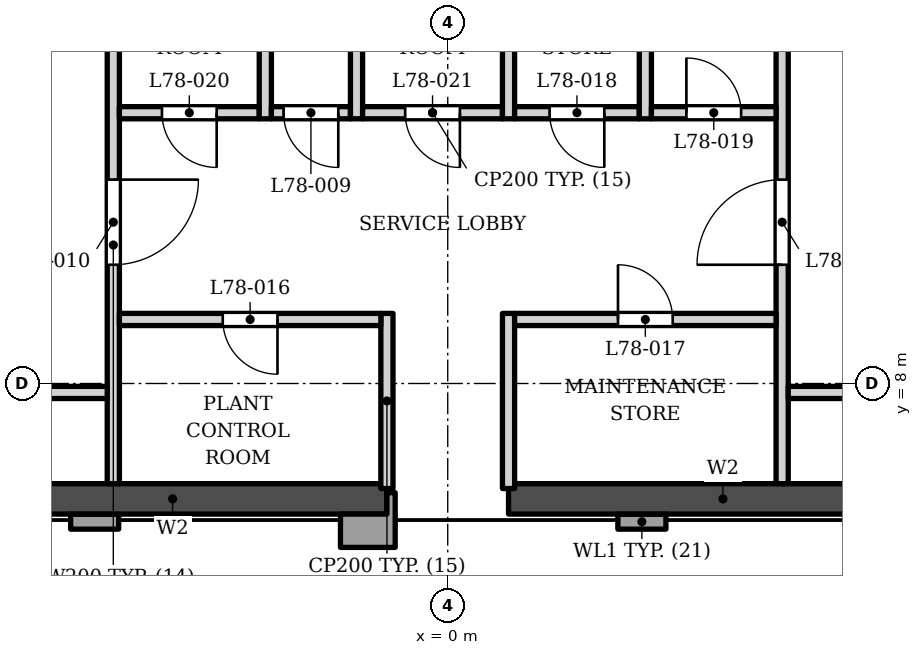
"""IFC4 building model, lengths in metres.
Left out: names, types, materials, properties, quantities, classifications, styles, units other than length and angle.
Written with IfcOpenShell. Run it as: python <this file> out.ifc"""

import sys

from ifc_helpers import new_model, si_unit, direction, frame, frame_2d, origin, place, context, subcontext, project, spatial, polyline, rectangle, outline, extrude, element, fill, save


model = new_model("IFC4")
c1 = context("Model", 3, precision=1e-05, world=origin(), true_north=direction((0.0, 1.0)))
c2 = subcontext(c1, "Body", "Model", "MODEL_VIEW")
j1 = project(units=[si_unit("LENGTHUNIT", "METRE"), si_unit("PLANEANGLEUNIT", "RADIAN")], contexts=[c1])
p1 = place(None, origin())
s1 = spatial("IfcSite", under=j1, at=p1, CompositionType="ELEMENT")
p2 = place(p1, origin())
s2 = spatial("IfcBuilding", under=s1, at=p2, CompositionType="ELEMENT")
p3 = place(p2, frame((0.0, 0.0, 335.5)))
s3 = spatial("IfcBuildingStorey", under=s2, at=p3, CompositionType="ELEMENT", Elevation=335.5)
for number, where, z_axis, x_axis in (
    (1, (-8.05, 6.103, 0.0), (0.0, 0.0, 1.0), (1.0, 0.0, 0.0)),
    (2, (1.0, 6.103, 0.0), (0.0, 0.0, 1.0), (1.0, 0.0, 0.0)),
):
    element("IfcWall", number, at=place(p3, frame(where, z_axis=z_axis, x_axis=x_axis)), inside=s3, PredefinedType="SHEAR", context=c2, shape_type="SweptSolid", body=[
        extrude(rectangle(XDim=7.05, YDim=0.5, at=frame_2d((3.525, 0.0))), origin(), (0.0, 0.0, 1.0), 3.758),
    ])
p4 = place(p3, origin())
e3 = element("IfcWall", 3, at=p4, inside=s3, PredefinedType="SOLIDWALL", context=c2, shape_type="SweptSolid", body=[
    extrude(outline(polyline([(-0.864, 5.304), (-0.864, 6.204), (-1.0, 6.204), (-1.0, 5.853), (-1.764, 5.853), (-1.764, 5.304), (-0.864, 5.304)])), origin(), (0.0, 0.0, 1.0), 3.297),
])
for number, where, z_axis, x_axis in (
    (4, (-6.202, 5.727, 0.0), (0.0, 0.0, 1.0), (1.0, 0.0, 0.0)),
    (5, (2.798, 5.727, 0.0), (0.0, 0.0, 1.0), (1.0, 0.0, 0.0)),
):
    element("IfcWall", number, at=place(p3, frame(where, z_axis=z_axis, x_axis=x_axis)), inside=s3, PredefinedType="ELEMENTEDWALL", context=c2, shape_type="SweptSolid", body=[
        extrude(rectangle(XDim=0.79, YDim=0.244, at=frame_2d((0.395, 0.0))), origin(), (0.0, 0.0, 1.0), 3.279),
    ])
for number, where, z_axis, x_axis in (
    (6, (-1.0, 6.273, 0.0), (0.0, 0.0, 1.0), (0.0, 1.0, 0.0)),
    (7, (1.0, 6.273, 0.0), (0.0, 0.0, 1.0), (0.0, 1.0, 0.0)),
):
    element("IfcWall", number, at=place(p3, frame(where, z_axis=z_axis, x_axis=x_axis)), inside=s3, PredefinedType="PARTITIONING", context=c2, shape_type="SweptSolid", body=[
        extrude(outline(polyline([(0.0, 0.0), (2.88, 0.0), (2.88, 4.7), (0.703, 4.7), (0.0, 4.11), (0.0, 0.0)])), frame((0.0, 0.1, 0.0), z_axis=(0.0, -1.0, 0.0), x_axis=(1.0, 0.0, 0.0)), (0.0, 0.0, 1.0), 0.2),
    ])
p5 = place(p3, frame((-5.5, 6.353, 0.0), z_axis=(0.0, 0.0, 1.0), x_axis=(0.0, 1.0, 0.0)))
e8 = element("IfcWall", 8, at=p5, inside=s3, PredefinedType="SOLIDWALL", context=c2, shape_type="SweptSolid", body=[
    extrude(outline(polyline([(0.0, 0.0), (7.85, 0.0), (7.85, 4.7), (0.623, 4.7), (0.0, 4.177), (0.0, 0.0)])), frame((0.0, 0.1, 0.0), z_axis=(0.0, -1.0, 0.0), x_axis=(1.0, 0.0, 0.0)), (0.0, 0.0, 1.0), 0.2),
])
p6 = place(p5, frame((3.6, 0.0, 0.0)))
e9 = element("IfcOpeningElement", 9, at=p6, cuts=e8, PredefinedType="OPENING", context=c2, shape_type="SweptSolid", body=[
    extrude(rectangle(XDim=1.4, YDim=2.1, at=frame_2d((0.7, 1.05))), frame((0.0, 0.11, 0.0), z_axis=(0.0, -1.0, 0.0), x_axis=(1.0, 0.0, 0.0)), (0.0, 0.0, 1.0), 0.22),
])
p7 = place(p3, frame((5.5, 6.353, 0.0), z_axis=(0.0, 0.0, 1.0), x_axis=(0.0, 1.0, 0.0)))
e10 = element("IfcWall", 10, at=p7, inside=s3, PredefinedType="SOLIDWALL", context=c2, shape_type="SweptSolid", body=[
    extrude(outline(polyline([(0.0, 0.0), (7.85, 0.0), (7.85, 4.7), (0.623, 4.7), (0.0, 4.177), (0.0, 0.0)])), frame((0.0, 0.1, 0.0), z_axis=(0.0, -1.0, 0.0), x_axis=(1.0, 0.0, 0.0)), (0.0, 0.0, 1.0), 0.2),
])
p8 = place(p7, frame((3.6, 0.0, 0.0)))
e11 = element("IfcOpeningElement", 11, at=p8, cuts=e10, PredefinedType="OPENING", context=c2, shape_type="SweptSolid", body=[
    extrude(rectangle(XDim=1.4, YDim=2.1, at=frame_2d((0.7, 1.05))), frame((0.0, 0.11, 0.0), z_axis=(0.0, -1.0, 0.0), x_axis=(1.0, 0.0, 0.0)), (0.0, 0.0, 1.0), 0.22),
])
for number, where, z_axis, x_axis in (
    (12, (-8.05, 7.853, 0.0), (0.0, 0.0, 1.0), (1.0, 0.0, 0.0)),
    (13, (5.6, 7.853, 0.0), (0.0, 0.0, 1.0), (1.0, 0.0, 0.0)),
):
    element("IfcWall", number, at=place(p3, frame(where, z_axis=z_axis, x_axis=x_axis)), inside=s3, PredefinedType="SOLIDWALL", context=c2, shape_type="SweptSolid", body=[
        extrude(rectangle(XDim=2.45, YDim=0.2, at=frame_2d((1.225, 0.0))), origin(), (0.0, 0.0, 1.0), 4.7),
    ])
p9 = place(p3, frame((-5.4, 9.052, 0.0), z_axis=(0.0, 0.0, 1.0), x_axis=(1.0, 0.0, 0.0)))
e14 = element("IfcWall", 14, at=p9, inside=s3, PredefinedType="PARTITIONING", context=c2, shape_type="SweptSolid", body=[
    extrude(rectangle(XDim=4.3, YDim=0.2, at=frame_2d((2.15, 0.0))), origin(), (0.0, 0.0, 1.0), 4.7),
])
p10 = place(p9, frame((1.7, 0.0, 0.0)))
e15 = element("IfcOpeningElement", 15, at=p10, cuts=e14, PredefinedType="OPENING", context=c2, shape_type="SweptSolid", body=[
    extrude(rectangle(XDim=0.9, YDim=2.1, at=frame_2d((0.45, 1.05))), frame((0.0, 0.11, 0.0), z_axis=(0.0, -1.0, 0.0), x_axis=(1.0, 0.0, 0.0)), (0.0, 0.0, 1.0), 0.22),
])
p11 = place(p3, frame((1.1, 9.052, 0.0), z_axis=(0.0, 0.0, 1.0), x_axis=(1.0, 0.0, 0.0)))
e16 = element("IfcWall", 16, at=p11, inside=s3, PredefinedType="PARTITIONING", context=c2, shape_type="SweptSolid", body=[
    extrude(rectangle(XDim=4.3, YDim=0.2, at=frame_2d((2.15, 0.0))), origin(), (0.0, 0.0, 1.0), 4.7),
])
p12 = place(p11, frame((1.7, 0.0, 0.0)))
e17 = element("IfcOpeningElement", 17, at=p12, cuts=e16, PredefinedType="OPENING", context=c2, shape_type="SweptSolid", body=[
    extrude(rectangle(XDim=0.9, YDim=2.1, at=frame_2d((0.45, 1.05))), frame((0.0, 0.11, 0.0), z_axis=(0.0, -1.0, 0.0), x_axis=(1.0, 0.0, 0.0)), (0.0, 0.0, 1.0), 0.22),
])
p13 = place(p3, frame((-5.4, 12.453, 0.0), z_axis=(0.0, 0.0, 1.0), x_axis=(1.0, 0.0, 0.0)))
e18 = element("IfcWall", 18, at=p13, inside=s3, PredefinedType="PARTITIONING", context=c2, shape_type="SweptSolid", body=[
    extrude(rectangle(XDim=2.3, YDim=0.2, at=frame_2d((1.15, 0.0))), origin(), (0.0, 0.0, 1.0), 4.7),
])
p14 = place(p13, frame((0.7, 0.0, 0.0)))
e19 = element("IfcOpeningElement", 19, at=p14, cuts=e18, PredefinedType="OPENING", context=c2, shape_type="SweptSolid", body=[
    extrude(rectangle(XDim=0.9, YDim=2.1, at=frame_2d((0.45, 1.05))), frame((0.0, 0.11, 0.0), z_axis=(0.0, -1.0, 0.0), x_axis=(1.0, 0.0, 0.0)), (0.0, 0.0, 1.0), 0.22),
])
p15 = place(p3, frame((-3.0, 12.353, 0.0), z_axis=(0.0, 0.0, 1.0), x_axis=(0.0, 1.0, 0.0)))
e20 = element("IfcWall", 20, at=p15, inside=s3, PredefinedType="PARTITIONING", context=c2, shape_type="SweptSolid", body=[
    extrude(rectangle(XDim=6.2, YDim=0.2, at=frame_2d((3.1, 0.0))), origin(), (0.0, 0.0, 1.0), 4.7),
])
p16 = place(p15, frame((3.425, 0.0, 0.0)))
e21 = element("IfcOpeningElement", 21, at=p16, cuts=e20, PredefinedType="OPENING", context=c2, shape_type="SweptSolid", body=[
    extrude(rectangle(XDim=0.9, YDim=2.1, at=frame_2d((0.45, 1.05))), frame((0.0, 0.11, 0.0), z_axis=(0.0, -1.0, 0.0), x_axis=(1.0, 0.0, 0.0)), (0.0, 0.0, 1.0), 0.22),
])
p17 = place(p15, frame((4.975, 0.0, 0.0)))
e22 = element("IfcOpeningElement", 22, at=p17, cuts=e20, PredefinedType="OPENING", context=c2, shape_type="SweptSolid", body=[
    extrude(rectangle(XDim=0.9, YDim=2.1, at=frame_2d((0.45, 1.05))), frame((0.0, 0.11, 0.0), z_axis=(0.0, -1.0, 0.0), x_axis=(1.0, 0.0, 0.0)), (0.0, 0.0, 1.0), 0.22),
])
p18 = place(p3, frame((-2.9, 12.453, 0.0), z_axis=(0.0, 0.0, 1.0), x_axis=(1.0, 0.0, 0.0)))
e23 = element("IfcWall", 23, at=p18, inside=s3, PredefinedType="PARTITIONING", context=c2, shape_type="SweptSolid", body=[
    extrude(rectangle(XDim=1.3, YDim=0.2, at=frame_2d((0.65, 0.0))), origin(), (0.0, 0.0, 1.0), 4.7),
])
p19 = place(p18, frame((0.2, 0.0, 0.0)))
e24 = element("IfcOpeningElement", 24, at=p19, cuts=e23, PredefinedType="OPENING", context=c2, shape_type="SweptSolid", body=[
    extrude(rectangle(XDim=0.9, YDim=2.1, at=frame_2d((0.45, 1.05))), frame((0.0, 0.11, 0.0), z_axis=(0.0, -1.0, 0.0), x_axis=(1.0, 0.0, 0.0)), (0.0, 0.0, 1.0), 0.22),
])
p20 = place(p3, frame((-1.5, 12.353, 0.0), z_axis=(0.0, 0.0, 1.0), x_axis=(0.0, 1.0, 0.0)))
e25 = element("IfcWall", 25, at=p20, inside=s3, PredefinedType="PARTITIONING", context=c2, shape_type="SweptSolid", body=[
    extrude(rectangle(XDim=6.2, YDim=0.2, at=frame_2d((3.1, 0.0))), origin(), (0.0, 0.0, 1.0), 4.7),
])
p21 = place(p20, frame((3.27, 0.0, 0.0)))
e26 = element("IfcOpeningElement", 26, at=p21, cuts=e25, PredefinedType="OPENING", context=c2, shape_type="SweptSolid", body=[
    extrude(rectangle(XDim=0.9, YDim=2.1, at=frame_2d((0.45, 1.05))), frame((0.0, 0.11, 0.0), z_axis=(0.0, -1.0, 0.0), x_axis=(1.0, 0.0, 0.0)), (0.0, 0.0, 1.0), 0.22),
])
p22 = place(p20, frame((4.82, 0.0, 0.0)))
e27 = element("IfcOpeningElement", 27, at=p22, cuts=e25, PredefinedType="OPENING", context=c2, shape_type="SweptSolid", body=[
    extrude(rectangle(XDim=0.9, YDim=2.1, at=frame_2d((0.45, 1.05))), frame((0.0, 0.11, 0.0), z_axis=(0.0, -1.0, 0.0), x_axis=(1.0, 0.0, 0.0)), (0.0, 0.0, 1.0), 0.22),
])
p23 = place(p3, frame((-1.4, 12.453, 0.0), z_axis=(0.0, 0.0, 1.0), x_axis=(1.0, 0.0, 0.0)))
e28 = element("IfcWall", 28, at=p23, inside=s3, PredefinedType="PARTITIONING", context=c2, shape_type="SweptSolid", body=[
    extrude(rectangle(XDim=2.3, YDim=0.2, at=frame_2d((1.15, 0.0))), origin(), (0.0, 0.0, 1.0), 4.7),
])
p24 = place(p23, frame((0.7, 0.0, 0.0)))
e29 = element("IfcOpeningElement", 29, at=p24, cuts=e28, PredefinedType="OPENING", context=c2, shape_type="SweptSolid", body=[
    extrude(rectangle(XDim=0.9, YDim=2.1, at=frame_2d((0.45, 1.05))), frame((0.0, 0.11, 0.0), z_axis=(0.0, -1.0, 0.0), x_axis=(1.0, 0.0, 0.0)), (0.0, 0.0, 1.0), 0.22),
])
p25 = place(p3, frame((1.0, 12.353, 0.0), z_axis=(0.0, 0.0, 1.0), x_axis=(0.0, 1.0, 0.0)))
e30 = element("IfcWall", 30, at=p25, inside=s3, PredefinedType="PARTITIONING", context=c2, shape_type="SweptSolid", body=[
    extrude(rectangle(XDim=3.2, YDim=0.2, at=frame_2d((1.6, 0.0))), origin(), (0.0, 0.0, 1.0), 4.7),
])
p26 = place(p3, frame((1.1, 12.453, 0.0), z_axis=(0.0, 0.0, 1.0), x_axis=(1.0, 0.0, 0.0)))
e31 = element("IfcWall", 31, at=p26, inside=s3, PredefinedType="PARTITIONING", context=c2, shape_type="SweptSolid", body=[
    extrude(rectangle(XDim=2.05, YDim=0.2, at=frame_2d((1.025, 0.0))), origin(), (0.0, 0.0, 1.0), 4.7),
])
p27 = place(p26, frame((0.575, 0.0, 0.0)))
e32 = element("IfcOpeningElement", 32, at=p27, cuts=e31, PredefinedType="OPENING", context=c2, shape_type="SweptSolid", body=[
    extrude(rectangle(XDim=0.9, YDim=2.1, at=frame_2d((0.45, 1.05))), frame((0.0, 0.11, 0.0), z_axis=(0.0, -1.0, 0.0), x_axis=(1.0, 0.0, 0.0)), (0.0, 0.0, 1.0), 0.22),
])
p28 = place(p3, frame((3.25, 12.353, 0.0), z_axis=(0.0, 0.0, 1.0), x_axis=(0.0, 1.0, 0.0)))
e33 = element("IfcWall", 33, at=p28, inside=s3, PredefinedType="PARTITIONING", context=c2, shape_type="SweptSolid", body=[
    extrude(rectangle(XDim=3.2, YDim=0.2, at=frame_2d((1.6, 0.0))), origin(), (0.0, 0.0, 1.0), 4.7),
])
p29 = place(p3, frame((3.35, 12.453, 0.0), z_axis=(0.0, 0.0, 1.0), x_axis=(1.0, 0.0, 0.0)))
e34 = element("IfcWall", 34, at=p29, inside=s3, PredefinedType="PARTITIONING", context=c2, shape_type="SweptSolid", body=[
    extrude(rectangle(XDim=2.05, YDim=0.2, at=frame_2d((1.025, 0.0))), origin(), (0.0, 0.0, 1.0), 4.7),
])
p30 = place(p29, frame((0.575, 0.0, 0.0)))
e35 = element("IfcOpeningElement", 35, at=p30, cuts=e34, PredefinedType="OPENING", context=c2, shape_type="SweptSolid", body=[
    extrude(rectangle(XDim=0.9, YDim=2.1, at=frame_2d((0.45, 1.05))), frame((0.0, 0.11, 0.0), z_axis=(0.0, -1.0, 0.0), x_axis=(1.0, 0.0, 0.0)), (0.0, 0.0, 1.0), 0.22),
])
p31 = place(p19, origin())
e36 = element("IfcDoor", 36, at=p31, inside=s3, OperationType="SINGLE_SWING_RIGHT", PredefinedType="DOOR", context=c2, shape_type="SweptSolid", body=[
    extrude(rectangle(XDim=0.9, YDim=2.1, at=frame_2d((0.45, 1.05))), frame((0.0, 0.025, 0.0), z_axis=(0.0, -1.0, 0.0), x_axis=(1.0, 0.0, 0.0)), (0.0, 0.0, 1.0), 0.05),
])
fill(e24, e36)
p32 = place(p6, origin())
e37 = element("IfcDoor", 37, at=p32, inside=s3, OperationType="SINGLE_SWING_RIGHT", PredefinedType="DOOR", context=c2, shape_type="SweptSolid", body=[
    extrude(rectangle(XDim=1.4, YDim=2.1, at=frame_2d((0.7, 1.05))), frame((0.0, 0.025, 0.0), z_axis=(0.0, -1.0, 0.0), x_axis=(1.0, 0.0, 0.0)), (0.0, 0.0, 1.0), 0.05),
])
fill(e9, e37)
p33 = place(p8, origin())
e38 = element("IfcDoor", 38, at=p33, inside=s3, OperationType="SINGLE_SWING_LEFT", PredefinedType="DOOR", context=c2, shape_type="SweptSolid", body=[
    extrude(rectangle(XDim=1.4, YDim=2.1, at=frame_2d((0.7, 1.05))), frame((0.0, 0.025, 0.0), z_axis=(0.0, -1.0, 0.0), x_axis=(1.0, 0.0, 0.0)), (0.0, 0.0, 1.0), 0.05),
])
fill(e11, e38)
p34 = place(p10, origin())
e39 = element("IfcDoor", 39, at=p34, inside=s3, OperationType="SINGLE_SWING_RIGHT", PredefinedType="DOOR", context=c2, shape_type="SweptSolid", body=[
    extrude(rectangle(XDim=0.9, YDim=2.1, at=frame_2d((0.45, 1.05))), frame((0.0, 0.025, 0.0), z_axis=(0.0, -1.0, 0.0), x_axis=(1.0, 0.0, 0.0)), (0.0, 0.0, 1.0), 0.05),
])
fill(e15, e39)
p35 = place(p12, origin())
e40 = element("IfcDoor", 40, at=p35, inside=s3, OperationType="SINGLE_SWING_LEFT", PredefinedType="DOOR", context=c2, shape_type="SweptSolid", body=[
    extrude(rectangle(XDim=0.9, YDim=2.1, at=frame_2d((0.45, 1.05))), frame((0.0, 0.025, 0.0), z_axis=(0.0, -1.0, 0.0), x_axis=(1.0, 0.0, 0.0)), (0.0, 0.0, 1.0), 0.05),
])
fill(e17, e40)
p36 = place(p27, origin())
e41 = element("IfcDoor", 41, at=p36, inside=s3, OperationType="SINGLE_SWING_RIGHT", PredefinedType="DOOR", context=c2, shape_type="SweptSolid", body=[
    extrude(rectangle(XDim=0.9, YDim=2.1, at=frame_2d((0.45, 1.05))), frame((0.0, 0.025, 0.0), z_axis=(0.0, -1.0, 0.0), x_axis=(1.0, 0.0, 0.0)), (0.0, 0.0, 1.0), 0.05),
])
fill(e32, e41)
p37 = place(p30, origin())
e42 = element("IfcDoor", 42, at=p37, inside=s3, OperationType="SINGLE_SWING_LEFT", PredefinedType="DOOR", context=c2, shape_type="SweptSolid", body=[
    extrude(rectangle(XDim=0.9, YDim=2.1, at=frame_2d((0.45, 1.05))), frame((0.0, 0.025, 0.0), z_axis=(0.0, -1.0, 0.0), x_axis=(1.0, 0.0, 0.0)), (0.0, 0.0, 1.0), 0.05),
])
fill(e35, e42)
p38 = place(p14, origin())
e43 = element("IfcDoor", 43, at=p38, inside=s3, OperationType="SINGLE_SWING_RIGHT", PredefinedType="DOOR", context=c2, shape_type="SweptSolid", body=[
    extrude(rectangle(XDim=0.9, YDim=2.1, at=frame_2d((0.45, 1.05))), frame((0.0, 0.025, 0.0), z_axis=(0.0, -1.0, 0.0), x_axis=(1.0, 0.0, 0.0)), (0.0, 0.0, 1.0), 0.05),
])
fill(e19, e43)
p39 = place(p24, origin())
e44 = element("IfcDoor", 44, at=p39, inside=s3, OperationType="SINGLE_SWING_RIGHT", PredefinedType="DOOR", context=c2, shape_type="SweptSolid", body=[
    extrude(rectangle(XDim=0.9, YDim=2.1, at=frame_2d((0.45, 1.05))), frame((0.0, 0.025, 0.0), z_axis=(0.0, -1.0, 0.0), x_axis=(1.0, 0.0, 0.0)), (0.0, 0.0, 1.0), 0.05),
])
fill(e29, e44)
save(model, sys.argv[1])
